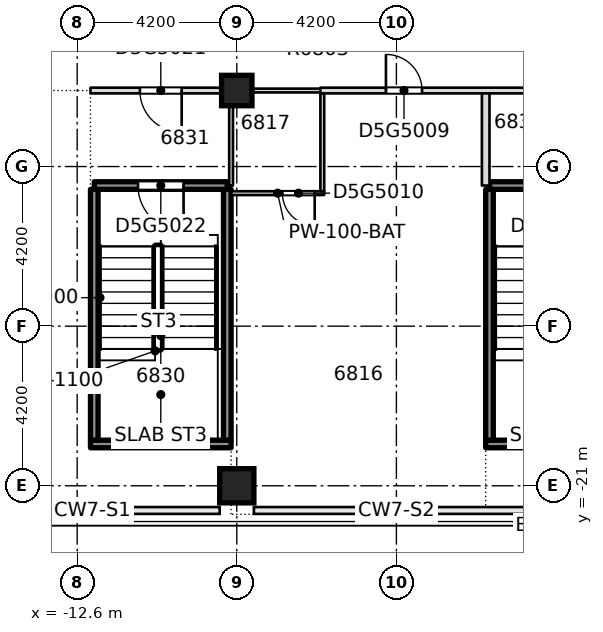
"""IFC4 building model, lengths in metres.
Left out: names, types, materials, properties, quantities, classifications, styles, units other than length and angle.
Written with IfcOpenShell. Run it as: python <this file> out.ifc"""

import sys

from ifc_helpers import new_model, si_unit, direction, frame, frame_2d, origin, origin_2d, place, context, subcontext, project, spatial, rectangle, extrude, element, fill, save


model = new_model("IFC4")
c1 = context("Model", 3, precision=1e-05, world=origin(), true_north=direction((0.0, 1.0)))
c2 = subcontext(c1, "Body", "Model", "MODEL_VIEW")
j1 = project(units=[si_unit("LENGTHUNIT", "METRE"), si_unit("PLANEANGLEUNIT", "RADIAN")], contexts=[c1])
p1 = place(None, origin())
s1 = spatial("IfcSite", under=j1, at=p1, CompositionType="ELEMENT")
p2 = place(p1, origin())
s2 = spatial("IfcBuilding", under=s1, at=p2, CompositionType="ELEMENT")
p3 = place(p2, frame((0.0, 0.0, 257.95)))
s3 = spatial("IfcBuildingStorey", under=s2, at=p3, CompositionType="ELEMENT", Elevation=257.95)
p4 = place(p3, frame((-8.4, -21.0, -0.4), z_axis=(0.0, 0.0, 1.0), x_axis=(1.0, 0.0, 0.0)))
e1 = element("IfcColumn", 1, at=p4, inside=s3, PredefinedType="COLUMN", context=c2, shape_type="SweptSolid", body=[
    extrude(rectangle(XDim=0.9, YDim=0.9, at=origin_2d()), origin(), (0.0, 0.0, 1.0), 3.45),
])
p5 = place(p3, frame((-8.4, -10.6, -0.4), z_axis=(0.0, 0.0, 1.0), x_axis=(1.0, 0.0, 0.0)))
e2 = element("IfcColumn", 2, at=p5, inside=s3, PredefinedType="COLUMN", context=c2, shape_type="SweptSolid", body=[
    extrude(rectangle(XDim=0.8, YDim=0.8, at=origin_2d()), origin(), (0.0, 0.0, 1.0), 3.45),
])
p6 = place(p3, frame((-8.55, -13.3, 0.0), z_axis=(0.0, 0.0, 1.0), x_axis=(1.0, 0.0, 0.0)))
e3 = element("IfcWall", 3, at=p6, inside=s3, PredefinedType="PARTITIONING", context=c2, shape_type="SweptSolid", body=[
    extrude(rectangle(XDim=2.45, YDim=0.1, at=frame_2d((1.225, 0.0))), origin(), (0.0, 0.0, 1.0), 3.05),
])
p7 = place(p6, frame((1.35, 0.0, 0.0)))
e4 = element("IfcOpeningElement", 4, at=p7, cuts=e3, PredefinedType="OPENING", context=c2, shape_type="SweptSolid", body=[
    extrude(rectangle(XDim=0.85, YDim=2.1, at=frame_2d((0.425, 1.05))), frame((0.0, 0.06, 0.0), z_axis=(0.0, -1.0, 0.0), x_axis=(1.0, 0.0, 0.0)), (0.0, 0.0, 1.0), 0.12),
])
p8 = place(p3, frame((-12.15, -13.1, 0.0), z_axis=(0.0, 0.0, 1.0), x_axis=(1.0, 0.0, 0.0)))
e5 = element("IfcWall", 5, at=p8, inside=s3, PredefinedType="SOLIDWALL", context=c2, shape_type="SweptSolid", body=[
    extrude(rectangle(XDim=3.5, YDim=0.2, at=frame_2d((1.75, 0.0))), origin(), (0.0, 0.0, 1.0), 3.05),
])
p9 = place(p8, frame((1.15, 0.0, 0.0)))
e6 = element("IfcOpeningElement", 6, at=p9, cuts=e5, PredefinedType="OPENING", context=c2, shape_type="SweptSolid", body=[
    extrude(rectangle(XDim=1.2, YDim=2.1, at=frame_2d((0.6, 1.05))), frame((0.0, 0.11, 0.0), z_axis=(0.0, -1.0, 0.0), x_axis=(1.0, 0.0, 0.0)), (0.0, 0.0, 1.0), 0.22),
])
p10 = place(p3, frame((-1.75, -13.1, 0.0), z_axis=(0.0, 0.0, 1.0), x_axis=(1.0, 0.0, 0.0)))
e7 = element("IfcWall", 7, at=p10, inside=s3, PredefinedType="SOLIDWALL", context=c2, shape_type="SweptSolid", body=[
    extrude(rectangle(XDim=3.5, YDim=0.2, at=frame_2d((1.75, 0.0))), origin(), (0.0, 0.0, 1.0), 3.05),
])
p11 = place(p10, frame((1.15, 0.0, 0.0)))
e8 = element("IfcOpeningElement", 8, at=p11, cuts=e7, PredefinedType="OPENING", context=c2, shape_type="SweptSolid", body=[
    extrude(rectangle(XDim=1.2, YDim=2.1, at=frame_2d((0.6, 1.05))), frame((0.0, 0.11, 0.0), z_axis=(0.0, -1.0, 0.0), x_axis=(1.0, 0.0, 0.0)), (0.0, 0.0, 1.0), 0.22),
])
p12 = place(p3, frame((-12.25, -10.6, 0.0), z_axis=(0.0, 0.0, 1.0), x_axis=(1.0, 0.0, 0.0)))
e9 = element("IfcWall", 9, at=p12, inside=s3, PredefinedType="PARTITIONING", context=c2, shape_type="SweptSolid", body=[
    extrude(rectangle(XDim=3.75, YDim=0.15, at=frame_2d((1.875, 0.0))), origin(), (0.0, 0.0, 1.0), 3.05),
])
p13 = place(p12, frame((1.3, 0.0, 0.0)))
e10 = element("IfcOpeningElement", 10, at=p13, cuts=e9, PredefinedType="OPENING", context=c2, shape_type="SweptSolid", body=[
    extrude(rectangle(XDim=1.1, YDim=2.1, at=frame_2d((0.55, 1.05))), frame((0.0, 0.085, 0.0), z_axis=(0.0, -1.0, 0.0), x_axis=(1.0, 0.0, 0.0)), (0.0, 0.0, 1.0), 0.17),
])
p14 = place(p3, frame((-8.6, -10.6, 0.0), z_axis=(0.0, 0.0, 1.0), x_axis=(1.0, 0.0, 0.0)))
e11 = element("IfcWall", 11, at=p14, inside=s3, PredefinedType="PARTITIONING", context=c2, shape_type="SweptSolid", body=[
    extrude(rectangle(XDim=2.5, YDim=0.1, at=frame_2d((1.25, 0.0))), origin(), (0.0, 0.0, 1.0), 3.05),
])
p15 = place(p3, frame((-6.2, -10.6, 0.0), z_axis=(0.0, 0.0, 1.0), x_axis=(1.0, 0.0, 0.0)))
e12 = element("IfcWall", 12, at=p15, inside=s3, PredefinedType="PARTITIONING", context=c2, shape_type="SweptSolid", body=[
    extrude(rectangle(XDim=8.1, YDim=0.15, at=frame_2d((4.05, 0.0))), origin(), (0.0, 0.0, 1.0), 3.05),
])
p16 = place(p15, frame((1.725, 0.0, 0.0)))
e13 = element("IfcOpeningElement", 13, at=p16, cuts=e12, PredefinedType="OPENING", context=c2, shape_type="SweptSolid", body=[
    extrude(rectangle(XDim=0.95, YDim=2.1, at=frame_2d((0.475, 1.05))), frame((0.0, 0.085, 0.0), z_axis=(0.0, -1.0, 0.0), x_axis=(1.0, 0.0, 0.0)), (0.0, 0.0, 1.0), 0.17),
])
p17 = place(p15, frame((6.7, 0.0, 0.0)))
e14 = element("IfcOpeningElement", 14, at=p17, cuts=e12, PredefinedType="OPENING", context=c2, shape_type="SweptSolid", body=[
    extrude(rectangle(XDim=1.1, YDim=2.1, at=frame_2d((0.55, 1.05))), frame((0.0, 0.085, 0.0), z_axis=(0.0, -1.0, 0.0), x_axis=(1.0, 0.0, 0.0)), (0.0, 0.0, 1.0), 0.17),
])
p18 = place(p3, frame((-8.55, -13.1, 0.0), z_axis=(0.0, 0.0, 1.0), x_axis=(0.0, 1.0, 0.0)))
e15 = element("IfcWall", 15, at=p18, inside=s3, PredefinedType="PARTITIONING", context=c2, shape_type="SweptSolid", body=[
    extrude(rectangle(XDim=2.425, YDim=0.1, at=frame_2d((1.212, 0.0))), origin(), (0.0, 0.0, 1.0), 3.05),
])
p19 = place(p3, frame((-6.15, -13.25, 0.0), z_axis=(0.0, 0.0, 1.0), x_axis=(0.0, 1.0, 0.0)))
e16 = element("IfcWall", 16, at=p19, inside=s3, PredefinedType="PARTITIONING", context=c2, shape_type="SweptSolid", body=[
    extrude(rectangle(XDim=2.575, YDim=0.1, at=frame_2d((1.288, 0.0))), origin(), (0.0, 0.0, 1.0), 3.05),
])
p20 = place(p3, frame((-1.85, -13.1, 0.0), z_axis=(0.0, 0.0, 1.0), x_axis=(0.0, 1.0, 0.0)))
e17 = element("IfcWall", 17, at=p20, inside=s3, PredefinedType="PARTITIONING", context=c2, shape_type="SweptSolid", body=[
    extrude(rectangle(XDim=2.425, YDim=0.2, at=frame_2d((1.212, 0.0))), origin(), (0.0, 0.0, 1.0), 3.05),
])
p21 = place(p3, frame((-12.25, -19.9, 0.0), z_axis=(0.0, 0.0, 1.0), x_axis=(1.0, 0.0, 0.0)))
e18 = element("IfcWall", 18, at=p21, inside=s3, PredefinedType="SOLIDWALL", context=c2, shape_type="SweptSolid", body=[
    extrude(rectangle(XDim=3.7, YDim=0.2, at=frame_2d((1.85, 0.0))), origin(), (0.0, 0.0, 1.0), 3.05),
])
for number, where, z_axis, x_axis in (
    (19, (-12.15, -19.8, 0.0), (0.0, 0.0, 1.0), (0.0, 1.0, 0.0)),
    (20, (-8.65, -19.8, 0.0), (0.0, 0.0, 1.0), (0.0, 1.0, 0.0)),
):
    element("IfcWall", number, at=place(p3, frame(where, z_axis=z_axis, x_axis=x_axis)), inside=s3, PredefinedType="SOLIDWALL", context=c2, shape_type="SweptSolid", body=[
        extrude(rectangle(XDim=6.6, YDim=0.2, at=frame_2d((3.3, 0.0))), origin(), (0.0, 0.0, 1.0), 3.05),
    ])
p22 = place(p3, frame((-1.85, -19.9, 0.0), z_axis=(0.0, 0.0, 1.0), x_axis=(1.0, 0.0, 0.0)))
e21 = element("IfcWall", 21, at=p22, inside=s3, PredefinedType="SOLIDWALL", context=c2, shape_type="SweptSolid", body=[
    extrude(rectangle(XDim=3.7, YDim=0.2, at=frame_2d((1.85, 0.0))), origin(), (0.0, 0.0, 1.0), 3.05),
])
p23 = place(p3, frame((-1.75, -19.8, 0.0), z_axis=(0.0, 0.0, 1.0), x_axis=(0.0, 1.0, 0.0)))
e22 = element("IfcWall", 22, at=p23, inside=s3, PredefinedType="SOLIDWALL", context=c2, shape_type="SweptSolid", body=[
    extrude(rectangle(XDim=6.6, YDim=0.2, at=frame_2d((3.3, 0.0))), origin(), (0.0, 0.0, 1.0), 3.05),
])
p24 = place(p16, origin())
e23 = element("IfcDoor", 23, at=p24, inside=s3, OperationType="SINGLE_SWING_LEFT", PredefinedType="DOOR", context=c2, shape_type="SweptSolid", body=[
    extrude(rectangle(XDim=0.95, YDim=2.1, at=frame_2d((0.475, 1.05))), frame((0.0, 0.025, 0.0), z_axis=(0.0, -1.0, 0.0), x_axis=(1.0, 0.0, 0.0)), (0.0, 0.0, 1.0), 0.05),
])
fill(e13, e23)
p25 = place(p7, origin())
e24 = element("IfcDoor", 24, at=p25, inside=s3, OperationType="SINGLE_SWING_LEFT", PredefinedType="DOOR", context=c2, shape_type="SweptSolid", body=[
    extrude(rectangle(XDim=0.85, YDim=2.1, at=frame_2d((0.425, 1.05))), frame((0.0, 0.025, 0.0), z_axis=(0.0, -1.0, 0.0), x_axis=(1.0, 0.0, 0.0)), (0.0, 0.0, 1.0), 0.05),
])
fill(e4, e24)
p26 = place(p13, origin())
e25 = element("IfcDoor", 25, at=p26, inside=s3, OperationType="SINGLE_SWING_RIGHT", PredefinedType="DOOR", context=c2, shape_type="SweptSolid", body=[
    extrude(rectangle(XDim=1.1, YDim=2.1, at=frame_2d((0.55, 1.05))), frame((0.0, 0.025, 0.0), z_axis=(0.0, -1.0, 0.0), x_axis=(1.0, 0.0, 0.0)), (0.0, 0.0, 1.0), 0.05),
])
fill(e10, e25)
p27 = place(p9, origin())
e26 = element("IfcDoor", 26, at=p27, inside=s3, OperationType="SINGLE_SWING_RIGHT", PredefinedType="DOOR", context=c2, shape_type="SweptSolid", body=[
    extrude(rectangle(XDim=1.2, YDim=2.1, at=frame_2d((0.6, 1.05))), frame((0.0, 0.025, 0.0), z_axis=(0.0, -1.0, 0.0), x_axis=(1.0, 0.0, 0.0)), (0.0, 0.0, 1.0), 0.05),
])
fill(e6, e26)
save(model, sys.argv[1])
